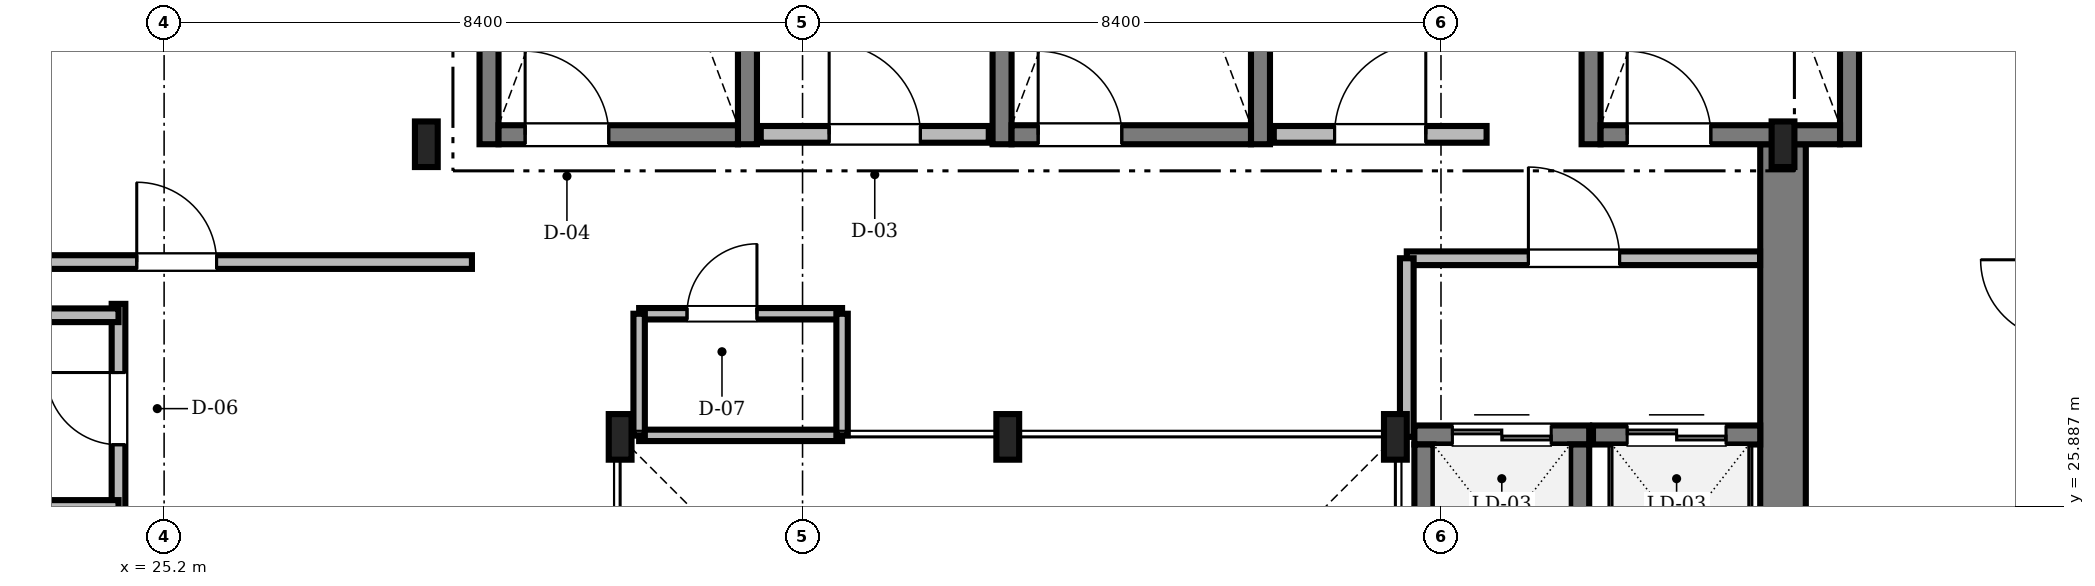
"""IFC4 building model, lengths in metres.
Left out: names, types, materials, properties, quantities, classifications, styles, units other than length and angle.
Written with IfcOpenShell. Run it as: python <this file> out.ifc"""

import sys

from ifc_helpers import new_model, si_unit, direction, frame, frame_2d, origin, origin_2d, place, context, subcontext, project, spatial, rectangle, i_section, extrude, source, transform, mapped, element, fill, save


model = new_model("IFC4")
c1 = context("Model", 3, precision=1e-05, world=origin(), true_north=direction((0.0, 1.0)))
c2 = subcontext(c1, "Body", "Model", "MODEL_VIEW")
j1 = project(units=[si_unit("LENGTHUNIT", "METRE"), si_unit("PLANEANGLEUNIT", "RADIAN")], contexts=[c1])
p1 = place(None, origin())
s1 = spatial("IfcSite", under=j1, at=p1, CompositionType="ELEMENT")
p2 = place(p1, origin())
s2 = spatial("IfcBuilding", under=s1, at=p2, CompositionType="ELEMENT")
p3 = place(p2, frame((0.0, 0.0, 274.3)))
s3 = spatial("IfcBuildingStorey", under=s2, at=p3, CompositionType="ELEMENT", Elevation=274.3)
m1 = source(origin(), c2, "Body", "SweptSolid", [
    extrude(rectangle(XDim=13.15, YDim=0.6, at=frame_2d((6.575, 0.0))), origin(), (0.0, 0.0, 1.0), 3.3),
])
p4 = place(p3, frame((46.5, 17.5, 0.0), z_axis=(0.0, 0.0, 1.0), x_axis=(0.0, 1.0, 0.0)))
e1 = element("IfcWall", 1, at=p4, inside=s3, PredefinedType="SHEAR", context=c2, shape_type="MappedRepresentation", body=[
    mapped(m1, transform((0.0, 0.0, 0.0), scale=1.0)),
])
m2 = source(origin(), c2, "Body", "SweptSolid", [
    extrude(i_section(OverallWidth=0.3, OverallDepth=0.6, WebThickness=0.015, FlangeThickness=0.03, FilletRadius=0.027, at=origin_2d()), origin(), (0.0, 0.0, 1.0), 3.3),
])
for number, where, z_axis, x_axis in (
    (2, (41.4, 26.8, 0.0), (0.0, 0.0, 1.0), (1.0, 0.0, 0.0)),
    (3, (36.3, 26.8, 0.0), (0.0, 0.0, 1.0), (1.0, 0.0, 0.0)),
    (4, (31.2, 26.8, 0.0), (0.0, 0.0, 1.0), (1.0, 0.0, 0.0)),
    (5, (28.65, 30.65, 0.0), (0.0, 0.0, 1.0), (1.0, 0.0, 0.0)),
    (6, (46.5, 30.65, 0.0), (0.0, 0.0, 1.0), (1.0, 0.0, 0.0)),
):
    element("IfcColumn", number, at=place(p3, frame(where, z_axis=z_axis, x_axis=x_axis)), inside=s3, PredefinedType="COLUMN", context=c2, shape_type="MappedRepresentation", body=[
        mapped(m2, transform((0.0, 0.0, 0.0), scale=1.0)),
    ])
m3 = source(origin(), c2, "Body", "SweptSolid", [
    extrude(rectangle(XDim=9.35, YDim=0.25, at=frame_2d((4.675, 0.0))), origin(), (0.0, 0.0, 1.0), 3.75),
])
for number, where, z_axis, x_axis in (
    (7, (29.475, 30.65, 0.0), (0.0, 0.0, 1.0), (0.0, 1.0, 0.0)),
    (8, (32.875, 30.65, 0.0), (0.0, 0.0, 1.0), (0.0, 1.0, 0.0)),
):
    element("IfcWall", number, at=place(p3, frame(where, z_axis=z_axis, x_axis=x_axis)), inside=s3, PredefinedType="SOLIDWALL", context=c2, shape_type="MappedRepresentation", body=[
        mapped(m3, transform((0.0, 0.0, 0.0), scale=1.0)),
    ])
m4 = source(origin(), c2, "Body", "SweptSolid", [
    extrude(rectangle(XDim=3.15, YDim=0.25, at=frame_2d((1.575, 0.0))), origin(), (0.0, 0.0, 1.0), 3.75),
])
p5 = place(p3, frame((29.6, 30.775, 0.0), z_axis=(0.0, 0.0, 1.0), x_axis=(1.0, 0.0, 0.0)))
e9 = element("IfcWall", 9, at=p5, inside=s3, PredefinedType="SOLIDWALL", context=c2, shape_type="MappedRepresentation", body=[
    mapped(m4, transform((0.0, 0.0, 0.0), scale=1.0)),
])
m5 = source(origin(), c2, "Body", "SweptSolid", [
    extrude(rectangle(XDim=1.1, YDim=2.2, at=frame_2d((0.55, 1.1))), frame((0.0, 0.135, 0.0), z_axis=(0.0, -1.0, 0.0), x_axis=(1.0, 0.0, 0.0)), (0.0, 0.0, 1.0), 0.27),
])
p6 = place(p5, frame((0.35, 0.0, 0.0)))
e10 = element("IfcOpeningElement", 10, at=p6, cuts=e9, PredefinedType="OPENING", context=c2, shape_type="MappedRepresentation", body=[
    mapped(m5, transform((0.0, 0.0, 0.0), scale=1.0)),
])
for number, where, z_axis, x_axis in (
    (11, (36.225, 30.65, 0.0), (0.0, 0.0, 1.0), (0.0, 1.0, 0.0)),
    (12, (39.625, 30.65, 0.0), (0.0, 0.0, 1.0), (0.0, 1.0, 0.0)),
):
    element("IfcWall", number, at=place(p3, frame(where, z_axis=z_axis, x_axis=x_axis)), inside=s3, PredefinedType="SOLIDWALL", context=c2, shape_type="MappedRepresentation", body=[
        mapped(m3, transform((0.0, 0.0, 0.0), scale=1.0)),
    ])
p7 = place(p3, frame((36.35, 30.775, 0.0), z_axis=(0.0, 0.0, 1.0), x_axis=(1.0, 0.0, 0.0)))
e13 = element("IfcWall", 13, at=p7, inside=s3, PredefinedType="SOLIDWALL", context=c2, shape_type="MappedRepresentation", body=[
    mapped(m4, transform((0.0, 0.0, 0.0), scale=1.0)),
])
p8 = place(p7, frame((0.35, 0.0, 0.0)))
e14 = element("IfcOpeningElement", 14, at=p8, cuts=e13, PredefinedType="OPENING", context=c2, shape_type="MappedRepresentation", body=[
    mapped(m5, transform((0.0, 0.0, 0.0), scale=1.0)),
])
for number, where, z_axis, x_axis in (
    (15, (43.975, 30.65, 0.0), (0.0, 0.0, 1.0), (0.0, 1.0, 0.0)),
    (16, (47.375, 30.65, 0.0), (0.0, 0.0, 1.0), (0.0, 1.0, 0.0)),
):
    element("IfcWall", number, at=place(p3, frame(where, z_axis=z_axis, x_axis=x_axis)), inside=s3, PredefinedType="SOLIDWALL", context=c2, shape_type="MappedRepresentation", body=[
        mapped(m3, transform((0.0, 0.0, 0.0), scale=1.0)),
    ])
p9 = place(p3, frame((44.1, 30.775, 0.0), z_axis=(0.0, 0.0, 1.0), x_axis=(1.0, 0.0, 0.0)))
e17 = element("IfcWall", 17, at=p9, inside=s3, PredefinedType="SOLIDWALL", context=c2, shape_type="MappedRepresentation", body=[
    mapped(m4, transform((0.0, 0.0, 0.0), scale=1.0)),
])
p10 = place(p9, frame((0.35, 0.0, 0.0)))
e18 = element("IfcOpeningElement", 18, at=p10, cuts=e17, PredefinedType="OPENING", context=c2, shape_type="MappedRepresentation", body=[
    mapped(m5, transform((0.0, 0.0, 0.0), scale=1.0)),
])
m6 = source(origin(), c2, "Body", "SweptSolid", [
    extrude(rectangle(XDim=3.0, YDim=0.22, at=frame_2d((1.5, 0.0))), origin(), (0.0, 0.0, 1.0), 3.3),
])
p11 = place(p3, frame((33.05, 30.78, 0.0), z_axis=(0.0, 0.0, 1.0), x_axis=(1.0, 0.0, 0.0)))
e19 = element("IfcWall", 19, at=p11, inside=s3, PredefinedType="SOLIDWALL", context=c2, shape_type="MappedRepresentation", body=[
    mapped(m6, transform((0.0, 0.0, 0.0), scale=1.0)),
])
m7 = source(origin(), c2, "Body", "SweptSolid", [
    extrude(rectangle(XDim=1.2, YDim=2.2, at=frame_2d((0.6, 1.1))), frame((0.0, 0.12, 0.0), z_axis=(0.0, -1.0, 0.0), x_axis=(1.0, 0.0, 0.0)), (0.0, 0.0, 1.0), 0.24),
])
p12 = place(p11, frame((0.9, 0.0, 0.0)))
e20 = element("IfcOpeningElement", 20, at=p12, cuts=e19, PredefinedType="OPENING", context=c2, shape_type="MappedRepresentation", body=[
    mapped(m7, transform((0.0, 0.0, 0.0), scale=1.0)),
])
m8 = source(origin(), c2, "Body", "SweptSolid", [
    extrude(rectangle(XDim=2.8, YDim=0.22, at=frame_2d((1.4, 0.0))), origin(), (0.0, 0.0, 1.0), 3.3),
])
p13 = place(p3, frame((39.8, 30.78, 0.0), z_axis=(0.0, 0.0, 1.0), x_axis=(1.0, 0.0, 0.0)))
e21 = element("IfcWall", 21, at=p13, inside=s3, PredefinedType="SOLIDWALL", context=c2, shape_type="MappedRepresentation", body=[
    mapped(m8, transform((0.0, 0.0, 0.0), scale=1.0)),
])
p14 = place(p13, frame((0.8, 0.0, 0.0)))
e22 = element("IfcOpeningElement", 22, at=p14, cuts=e21, PredefinedType="OPENING", context=c2, shape_type="MappedRepresentation", body=[
    mapped(m7, transform((0.0, 0.0, 0.0), scale=1.0)),
])
m9 = source(origin(), c2, "Body", "SweptSolid", [
    extrude(rectangle(XDim=2.3, YDim=0.25, at=frame_2d((1.15, 0.0))), origin(), (0.0, 0.0, 1.0), 3.3),
])
p15 = place(p3, frame((41.65, 26.825, 0.0), z_axis=(0.0, 0.0, 1.0), x_axis=(1.0, 0.0, 0.0)))
e23 = element("IfcWall", 23, at=p15, inside=s3, PredefinedType="SOLIDWALL", context=c2, shape_type="MappedRepresentation", body=[
    mapped(m9, transform((0.0, 0.0, 0.0), scale=1.0)),
])
m10 = source(origin(), c2, "Body", "SweptSolid", [
    extrude(rectangle(XDim=1.3, YDim=2.3, at=frame_2d((0.65, 1.15))), frame((0.0, 0.135, 0.0), z_axis=(0.0, -1.0, 0.0), x_axis=(1.0, 0.0, 0.0)), (0.0, 0.0, 1.0), 0.27),
])
p16 = place(p15, frame((0.5, 0.0, 0.0)))
e24 = element("IfcOpeningElement", 24, at=p16, cuts=e23, PredefinedType="OPENING", context=c2, shape_type="MappedRepresentation", body=[
    mapped(m10, transform((0.0, 0.0, 0.0), scale=1.0)),
])
for number, where, z_axis, x_axis in (
    (25, (41.775, 24.4, 0.0), (0.0, 0.0, 1.0), (0.0, 1.0, 0.0)),
    (26, (43.825, 24.4, 0.0), (0.0, 0.0, 1.0), (0.0, 1.0, 0.0)),
):
    element("IfcWall", number, at=place(p3, frame(where, z_axis=z_axis, x_axis=x_axis)), inside=s3, PredefinedType="SOLIDWALL", context=c2, shape_type="MappedRepresentation", body=[
        mapped(m9, transform((0.0, 0.0, 0.0), scale=1.0)),
    ])
m11 = source(origin(), c2, "Body", "SweptSolid", [
    extrude(rectangle(XDim=2.2, YDim=0.25, at=frame_2d((1.1, 0.0))), origin(), (0.0, 0.0, 1.0), 3.3),
])
p17 = place(p3, frame((44.0, 26.825, 0.0), z_axis=(0.0, 0.0, 1.0), x_axis=(1.0, 0.0, 0.0)))
e27 = element("IfcWall", 27, at=p17, inside=s3, PredefinedType="SOLIDWALL", context=c2, shape_type="MappedRepresentation", body=[
    mapped(m11, transform((0.0, 0.0, 0.0), scale=1.0)),
])
p18 = place(p17, frame((0.45, 0.0, 0.0)))
e28 = element("IfcOpeningElement", 28, at=p18, cuts=e27, PredefinedType="OPENING", context=c2, shape_type="MappedRepresentation", body=[
    mapped(m10, transform((0.0, 0.0, 0.0), scale=1.0)),
])
m12 = source(origin(), c2, "Body", "SweptSolid", [
    extrude(rectangle(XDim=14.6, YDim=0.18, at=frame_2d((7.3, 0.0))), origin(), (0.0, 0.0, 1.0), 2.742),
])
p19 = place(p3, frame((24.6, 13.95, 0.0), z_axis=(0.0, 0.0, 1.0), x_axis=(0.0, 1.0, 0.0)))
e29 = element("IfcWall", 29, at=p19, inside=s3, PredefinedType="PARTITIONING", context=c2, shape_type="MappedRepresentation", body=[
    mapped(m12, transform((0.0, 0.0, 0.0), scale=1.0)),
])
m13 = source(origin(), c2, "Body", "SweptSolid", [
    extrude(rectangle(XDim=1.05, YDim=2.2, at=frame_2d((0.525, 1.1))), frame((0.0, 0.1, 0.0), z_axis=(0.0, -1.0, 0.0), x_axis=(1.0, 0.0, 0.0)), (0.0, 0.0, 1.0), 0.2),
])
p20 = place(p19, frame((1.888, 0.0, 0.0)))
e30 = element("IfcOpeningElement", 30, at=p20, cuts=e29, PredefinedType="OPENING", context=c2, shape_type="MappedRepresentation", body=[
    mapped(m13, transform((0.0, 0.0, 0.0), scale=1.0)),
])
m14 = source(origin(), c2, "Body", "SweptSolid", [
    extrude(rectangle(XDim=0.95, YDim=2.15, at=frame_2d((0.475, 1.075))), frame((0.0, 0.1, 0.0), z_axis=(0.0, -1.0, 0.0), x_axis=(1.0, 0.0, 0.0)), (0.0, 0.0, 1.0), 0.2),
])
p21 = place(p19, frame((7.93, 0.0, 0.0)))
e31 = element("IfcOpeningElement", 31, at=p21, cuts=e29, PredefinedType="OPENING", context=c2, shape_type="MappedRepresentation", body=[
    mapped(m14, transform((0.0, 0.0, 0.0), scale=1.0)),
])
p22 = place(p19, frame((12.747, 0.0, 0.0)))
e32 = element("IfcOpeningElement", 32, at=p22, cuts=e29, PredefinedType="OPENING", context=c2, shape_type="MappedRepresentation", body=[
    mapped(m14, transform((0.0, 0.0, 0.0), scale=1.0)),
])
m15 = source(origin(), c2, "Body", "SweptSolid", [
    extrude(rectangle(XDim=10.628, YDim=0.18, at=frame_2d((5.314, 0.0))), origin(), (0.0, 0.0, 1.0), 2.542),
])
p23 = place(p3, frame((18.622, 29.1, 0.0), z_axis=(0.0, 0.0, 1.0), x_axis=(1.0, 0.0, 0.0)))
e33 = element("IfcWall", 33, at=p23, inside=s3, PredefinedType="PARTITIONING", context=c2, shape_type="MappedRepresentation", body=[
    mapped(m15, transform((0.0, 0.0, 0.0), scale=1.0)),
])
p24 = place(p23, frame((6.218, 0.0, 0.0)))
e34 = element("IfcOpeningElement", 34, at=p24, cuts=e33, PredefinedType="OPENING", context=c2, shape_type="MappedRepresentation", body=[
    mapped(m13, transform((0.0, 0.0, 0.0), scale=1.0)),
])
m16 = source(origin(), c2, "Body", "SweptSolid", [
    extrude(rectangle(XDim=4.648, YDim=0.18, at=frame_2d((2.324, 0.0))), origin(), (0.0, 0.0, 1.0), 2.932),
])
p25 = place(p3, frame((41.55, 29.15, 0.0), z_axis=(0.0, 0.0, 1.0), x_axis=(1.0, 0.0, 0.0)))
e35 = element("IfcWall", 35, at=p25, inside=s3, PredefinedType="PARTITIONING", context=c2, shape_type="MappedRepresentation", body=[
    mapped(m16, transform((0.0, 0.0, 0.0), scale=1.0)),
])
m17 = source(origin(), c2, "Body", "SweptSolid", [
    extrude(rectangle(XDim=1.2, YDim=2.2, at=frame_2d((0.6, 1.1))), frame((0.0, 0.1, 0.0), z_axis=(0.0, -1.0, 0.0), x_axis=(1.0, 0.0, 0.0)), (0.0, 0.0, 1.0), 0.2),
])
p26 = place(p25, frame((1.6, 0.0, 0.0)))
e36 = element("IfcOpeningElement", 36, at=p26, cuts=e35, PredefinedType="OPENING", context=c2, shape_type="MappedRepresentation", body=[
    mapped(m17, transform((0.0, 0.0, 0.0), scale=1.0)),
])
m18 = source(origin(), c2, "Body", "SweptSolid", [
    extrude(rectangle(XDim=2.67, YDim=0.15, at=frame_2d((1.335, 0.0))), origin(), (0.0, 0.0, 1.0), 2.932),
])
p27 = place(p3, frame((31.45, 28.42, 0.0), z_axis=(0.0, 0.0, 1.0), x_axis=(1.0, 0.0, 0.0)))
e37 = element("IfcWall", 37, at=p27, inside=s3, PredefinedType="PARTITIONING", context=c2, shape_type="MappedRepresentation", body=[
    mapped(m18, transform((0.0, 0.0, 0.0), scale=1.0)),
])
m19 = source(origin(), c2, "Body", "SweptSolid", [
    extrude(rectangle(XDim=0.92, YDim=2.1, at=frame_2d((0.46, 1.05))), frame((0.0, 0.085, 0.0), z_axis=(0.0, -1.0, 0.0), x_axis=(1.0, 0.0, 0.0)), (0.0, 0.0, 1.0), 0.17),
])
p28 = place(p27, frame((0.63, 0.0, 0.0)))
e38 = element("IfcOpeningElement", 38, at=p28, cuts=e37, PredefinedType="OPENING", context=c2, shape_type="MappedRepresentation", body=[
    mapped(m19, transform((0.0, 0.0, 0.0), scale=1.0)),
])
m20 = source(origin(), c2, "Body", "SweptSolid", [
    extrude(rectangle(XDim=6.17, YDim=0.18, at=frame_2d((3.085, 0.0))), origin(), (0.0, 0.0, 1.0), 2.542),
])
p29 = place(p3, frame((18.43, 28.4, 0.0), z_axis=(0.0, 0.0, 1.0), x_axis=(1.0, 0.0, 0.0)))
e39 = element("IfcWall", 39, at=p29, inside=s3, PredefinedType="PARTITIONING", context=c2, shape_type="MappedRepresentation", body=[
    mapped(m20, transform((0.0, 0.0, 0.0), scale=1.0)),
])
m21 = source(origin(), c2, "Body", "SweptSolid", [
    extrude(rectangle(XDim=2.67, YDim=0.15, at=frame_2d((1.335, 0.0))), origin(), (0.0, 0.0, 1.0), 2.842),
])
p30 = place(p3, frame((31.45, 26.82, 0.0), z_axis=(0.0, 0.0, 1.0), x_axis=(1.0, 0.0, 0.0)))
e40 = element("IfcWall", 40, at=p30, inside=s3, PredefinedType="PARTITIONING", context=c2, shape_type="MappedRepresentation", body=[
    mapped(m21, transform((0.0, 0.0, 0.0), scale=1.0)),
])
m22 = source(origin(), c2, "Body", "SweptSolid", [
    extrude(rectangle(XDim=2.36, YDim=0.15, at=frame_2d((1.18, 0.0))), origin(), (0.0, 0.0, 1.0), 3.3),
])
p31 = place(p3, frame((22.24, 25.893, 0.0), z_axis=(0.0, 0.0, 1.0), x_axis=(1.0, 0.0, 0.0)))
e41 = element("IfcWall", 41, at=p31, inside=s3, PredefinedType="PARTITIONING", context=c2, shape_type="MappedRepresentation", body=[
    mapped(m22, transform((0.0, 0.0, 0.0), scale=1.0)),
])
m23 = source(origin(), c2, "Body", "SweptSolid", [
    extrude(rectangle(XDim=2.35, YDim=0.18, at=frame_2d((1.175, 0.0))), origin(), (0.0, 0.0, 1.0), 2.932),
])
p32 = place(p3, frame((41.55, 26.8, 0.0), z_axis=(0.0, 0.0, 1.0), x_axis=(0.0, 1.0, 0.0)))
e42 = element("IfcWall", 42, at=p32, inside=s3, PredefinedType="PARTITIONING", context=c2, shape_type="MappedRepresentation", body=[
    mapped(m23, transform((0.0, 0.0, 0.0), scale=1.0)),
])
m24 = source(origin(), c2, "Body", "SweptSolid", [
    extrude(rectangle(XDim=1.6, YDim=0.15, at=frame_2d((0.8, 0.0))), origin(), (0.0, 0.0, 1.0), 2.842),
])
for number, where, z_axis, x_axis in (
    (43, (31.45, 26.82, 0.0), (0.0, 0.0, 1.0), (0.0, 1.0, 0.0)),
    (44, (34.12, 26.82, 0.0), (0.0, 0.0, 1.0), (0.0, 1.0, 0.0)),
):
    element("IfcWall", number, at=place(p3, frame(where, z_axis=z_axis, x_axis=x_axis)), inside=s3, PredefinedType="PARTITIONING", context=c2, shape_type="MappedRepresentation", body=[
        mapped(m24, transform((0.0, 0.0, 0.0), scale=1.0)),
    ])
m25 = source(origin(), c2, "Body", "SweptSolid", [
    extrude(rectangle(XDim=1.1, YDim=2.2, at=frame_2d((0.55, 1.1))), frame((0.0, 0.025, 0.0), z_axis=(0.0, -1.0, 0.0), x_axis=(1.0, 0.0, 0.0)), (0.0, 0.0, 1.0), 0.05),
])
p33 = place(p6, origin())
e45 = element("IfcDoor", 45, at=p33, inside=s3, OperationType="SINGLE_SWING_LEFT", PredefinedType="DOOR", context=c2, shape_type="MappedRepresentation", body=[
    mapped(m25, transform((0.0, 0.0, 0.0), scale=1.0)),
])
fill(e10, e45)
p34 = place(p8, origin())
e46 = element("IfcDoor", 46, at=p34, inside=s3, OperationType="SINGLE_SWING_LEFT", PredefinedType="DOOR", context=c2, shape_type="MappedRepresentation", body=[
    mapped(m25, transform((0.0, 0.0, 0.0), scale=1.0)),
])
fill(e14, e46)
p35 = place(p10, origin())
e47 = element("IfcDoor", 47, at=p35, inside=s3, OperationType="SINGLE_SWING_LEFT", PredefinedType="DOOR", context=c2, shape_type="MappedRepresentation", body=[
    mapped(m25, transform((0.0, 0.0, 0.0), scale=1.0)),
])
fill(e18, e47)
m26 = source(origin(), c2, "Body", "SweptSolid", [
    extrude(rectangle(XDim=1.2, YDim=2.2, at=frame_2d((0.6, 1.1))), frame((0.0, 0.025, 0.0), z_axis=(0.0, -1.0, 0.0), x_axis=(1.0, 0.0, 0.0)), (0.0, 0.0, 1.0), 0.05),
])
p36 = place(p12, origin())
e48 = element("IfcDoor", 48, at=p36, inside=s3, OperationType="SINGLE_SWING_LEFT", PredefinedType="DOOR", context=c2, shape_type="MappedRepresentation", body=[
    mapped(m26, transform((0.0, 0.0, 0.0), scale=1.0)),
])
fill(e20, e48)
p37 = place(p14, origin())
e49 = element("IfcDoor", 49, at=p37, inside=s3, OperationType="SINGLE_SWING_RIGHT", PredefinedType="DOOR", context=c2, shape_type="MappedRepresentation", body=[
    mapped(m26, transform((0.0, 0.0, 0.0), scale=1.0)),
])
fill(e22, e49)
m27 = source(origin(), c2, "Body", "SweptSolid", [
    extrude(rectangle(XDim=1.3, YDim=2.3, at=frame_2d((0.65, 1.15))), frame((0.0, 0.025, 0.0), z_axis=(0.0, -1.0, 0.0), x_axis=(1.0, 0.0, 0.0)), (0.0, 0.0, 1.0), 0.05),
])
p38 = place(p16, origin())
e50 = element("IfcDoor", 50, at=p38, inside=s3, OperationType="DOUBLE_DOOR_SLIDING", PredefinedType="DOOR", context=c2, shape_type="MappedRepresentation", body=[
    mapped(m27, transform((0.0, 0.0, 0.0), scale=1.0)),
])
fill(e24, e50)
p39 = place(p18, origin())
e51 = element("IfcDoor", 51, at=p39, inside=s3, OperationType="DOUBLE_DOOR_SLIDING", PredefinedType="DOOR", context=c2, shape_type="MappedRepresentation", body=[
    mapped(m27, transform((0.0, 0.0, 0.0), scale=1.0)),
])
fill(e28, e51)
m28 = source(origin(), c2, "Body", "SweptSolid", [
    extrude(rectangle(XDim=0.95, YDim=2.15, at=frame_2d((0.475, 1.075))), frame((0.0, 0.025, 0.0), z_axis=(0.0, -1.0, 0.0), x_axis=(1.0, 0.0, 0.0)), (0.0, 0.0, 1.0), 0.05),
])
p40 = place(p22, origin())
e52 = element("IfcDoor", 52, at=p40, inside=s3, OperationType="SINGLE_SWING_RIGHT", PredefinedType="DOOR", context=c2, shape_type="MappedRepresentation", body=[
    mapped(m28, transform((0.0, 0.0, 0.0), scale=1.0)),
])
fill(e32, e52)
m29 = source(origin(), c2, "Body", "SweptSolid", [
    extrude(rectangle(XDim=1.05, YDim=2.2, at=frame_2d((0.525, 1.1))), frame((0.0, 0.025, 0.0), z_axis=(0.0, -1.0, 0.0), x_axis=(1.0, 0.0, 0.0)), (0.0, 0.0, 1.0), 0.05),
])
p41 = place(p24, origin())
e53 = element("IfcDoor", 53, at=p41, inside=s3, OperationType="SINGLE_SWING_LEFT", PredefinedType="DOOR", context=c2, shape_type="MappedRepresentation", body=[
    mapped(m29, transform((0.0, 0.0, 0.0), scale=1.0)),
])
fill(e34, e53)
p42 = place(p26, origin())
e54 = element("IfcDoor", 54, at=p42, inside=s3, OperationType="SINGLE_SWING_LEFT", PredefinedType="DOOR", context=c2, shape_type="MappedRepresentation", body=[
    mapped(m26, transform((0.0, 0.0, 0.0), scale=1.0)),
])
fill(e36, e54)
m30 = source(origin(), c2, "Body", "SweptSolid", [
    extrude(rectangle(XDim=0.92, YDim=2.1, at=frame_2d((0.46, 1.05))), frame((0.0, 0.025, 0.0), z_axis=(0.0, -1.0, 0.0), x_axis=(1.0, 0.0, 0.0)), (0.0, 0.0, 1.0), 0.05),
])
p43 = place(p28, origin())
e55 = element("IfcDoor", 55, at=p43, inside=s3, OperationType="SINGLE_SWING_RIGHT", PredefinedType="DOOR", context=c2, shape_type="MappedRepresentation", body=[
    mapped(m30, transform((0.0, 0.0, 0.0), scale=1.0)),
])
fill(e38, e55)
save(model, sys.argv[1])
